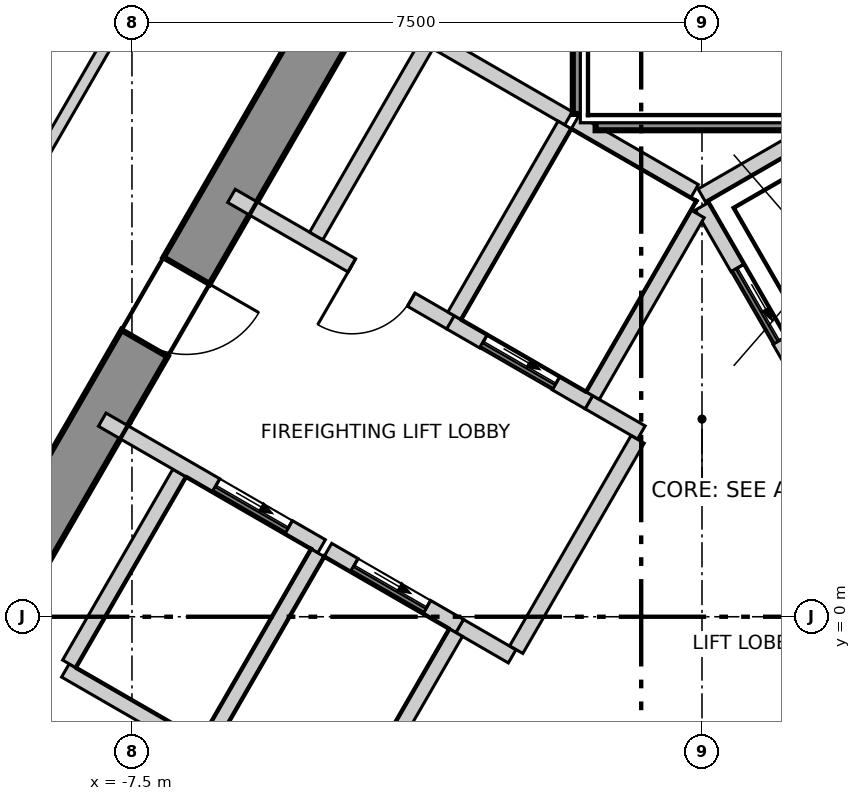
"""IFC4 building model, lengths in metres.
Left out: names, types, materials, properties, quantities, classifications, styles, units other than length and angle.
Written with IfcOpenShell. Run it as: python <this file> out.ifc"""

import sys

from ifc_helpers import new_model, si_unit, direction, frame, frame_2d, origin, place, context, subcontext, project, spatial, polyline, rectangle, outline, extrude, element, fill, save


model = new_model("IFC4")
c1 = context("Model", 3, precision=1e-05, world=origin(), true_north=direction((0.0, 1.0)))
c2 = subcontext(c1, "Body", "Model", "MODEL_VIEW")
j1 = project(units=[si_unit("LENGTHUNIT", "METRE"), si_unit("PLANEANGLEUNIT", "RADIAN")], contexts=[c1])
p1 = place(None, origin())
s1 = spatial("IfcSite", under=j1, at=p1, CompositionType="ELEMENT")
p2 = place(p1, origin())
s2 = spatial("IfcBuilding", under=s1, at=p2, CompositionType="ELEMENT")
p3 = place(p2, frame((0.0, 0.0, 251.3)))
s3 = spatial("IfcBuildingStorey", under=s2, at=p3, CompositionType="ELEMENT", Elevation=251.3)
p4 = place(p3, frame((-1.703, 13.35, -0.3), z_axis=(0.0, 0.0, 1.0), x_axis=(-0.500011533395, -0.866018744874, 0.0)))
e1 = element("IfcWall", 1, at=p4, inside=s3, PredefinedType="SHEAR", context=c2, shape_type="SweptSolid", body=[
    extrude(outline(polyline([(-0.202, -0.35), (1.782, -0.35), (3.766, -0.35), (5.75, -0.35), (7.734, -0.35), (9.718, -0.35), (11.702, -0.35), (13.686, -0.35), (15.67, -0.35), (17.654, -0.35), (19.638, -0.35), (21.622, -0.35), (21.218, 0.35), (19.307, 0.35), (17.397, 0.35), (15.486, 0.35), (13.576, 0.35), (11.665, 0.35), (9.755, 0.35), (7.844, 0.35), (5.934, 0.35), (4.023, 0.35), (2.113, 0.35), (0.202, 0.35), (-0.202, -0.35)])), origin(), (0.0, 0.0, 1.0), 4.2),
])
p5 = place(p4, frame((10.16, 0.0, 0.3)))
e2 = element("IfcOpeningElement", 2, at=p5, cuts=e1, PredefinedType="OPENING", context=c2, shape_type="SweptSolid", body=[
    extrude(rectangle(XDim=1.1, YDim=2.1, at=frame_2d((0.55, 1.05))), frame((0.0, 0.36, 0.0), z_axis=(0.0, -1.0, 0.0), x_axis=(1.0, 0.0, 0.0)), (0.0, 0.0, 1.0), 0.72),
])
p6 = place(p3, frame((-2.641, 29.489, 0.0), z_axis=(0.0, 0.0, 1.0), x_axis=(-0.500004868955, -0.866022592674, 0.0)))
e3 = element("IfcWall", 3, at=p6, inside=s3, PredefinedType="ELEMENTEDWALL", context=c2, shape_type="SweptSolid", body=[
    extrude(rectangle(XDim=48.416, YDim=0.2, at=frame_2d((24.208, 0.0))), origin(), (0.0, 0.0, 1.0), 3.9),
])
p7 = place(p6, frame((2.067, 0.0, 0.9)))
e4 = element("IfcOpeningElement", 4, at=p7, cuts=e3, PredefinedType="OPENING", context=c2, shape_type="SweptSolid", body=[
    extrude(rectangle(XDim=4.2, YDim=2.5, at=frame_2d((2.1, 1.25))), frame((0.0, 0.11, 0.0), z_axis=(0.0, -1.0, 0.0), x_axis=(1.0, 0.0, 0.0)), (0.0, 0.0, 1.0), 0.22),
])
p8 = place(p6, frame((7.796, 0.0, 0.9)))
e5 = element("IfcOpeningElement", 5, at=p8, cuts=e3, PredefinedType="OPENING", context=c2, shape_type="SweptSolid", body=[
    extrude(rectangle(XDim=4.2, YDim=2.5, at=frame_2d((2.1, 1.25))), frame((0.0, 0.11, 0.0), z_axis=(0.0, -1.0, 0.0), x_axis=(1.0, 0.0, 0.0)), (0.0, 0.0, 1.0), 0.22),
])
p9 = place(p6, frame((13.524, 0.0, 0.9)))
e6 = element("IfcOpeningElement", 6, at=p9, cuts=e3, PredefinedType="OPENING", context=c2, shape_type="SweptSolid", body=[
    extrude(rectangle(XDim=4.2, YDim=2.5, at=frame_2d((2.1, 1.25))), frame((0.0, 0.11, 0.0), z_axis=(0.0, -1.0, 0.0), x_axis=(1.0, 0.0, 0.0)), (0.0, 0.0, 1.0), 0.22),
])
p10 = place(p6, frame((19.253, 0.0, 0.9)))
e7 = element("IfcOpeningElement", 7, at=p10, cuts=e3, PredefinedType="OPENING", context=c2, shape_type="SweptSolid", body=[
    extrude(rectangle(XDim=4.2, YDim=2.5, at=frame_2d((2.1, 1.25))), frame((0.0, 0.11, 0.0), z_axis=(0.0, -1.0, 0.0), x_axis=(1.0, 0.0, 0.0)), (0.0, 0.0, 1.0), 0.22),
])
p11 = place(p6, frame((24.982, 0.0, 0.9)))
e8 = element("IfcOpeningElement", 8, at=p11, cuts=e3, PredefinedType="OPENING", context=c2, shape_type="SweptSolid", body=[
    extrude(rectangle(XDim=4.2, YDim=2.5, at=frame_2d((2.1, 1.25))), frame((0.0, 0.11, 0.0), z_axis=(0.0, -1.0, 0.0), x_axis=(1.0, 0.0, 0.0)), (0.0, 0.0, 1.0), 0.22),
])
p12 = place(p6, frame((30.711, 0.0, 0.9)))
e9 = element("IfcOpeningElement", 9, at=p12, cuts=e3, PredefinedType="OPENING", context=c2, shape_type="SweptSolid", body=[
    extrude(rectangle(XDim=4.2, YDim=2.5, at=frame_2d((2.1, 1.25))), frame((0.0, 0.11, 0.0), z_axis=(0.0, -1.0, 0.0), x_axis=(1.0, 0.0, 0.0)), (0.0, 0.0, 1.0), 0.22),
])
p13 = place(p6, frame((36.439, 0.0, 0.9)))
e10 = element("IfcOpeningElement", 10, at=p13, cuts=e3, PredefinedType="OPENING", context=c2, shape_type="SweptSolid", body=[
    extrude(rectangle(XDim=4.2, YDim=2.5, at=frame_2d((2.1, 1.25))), frame((0.0, 0.11, 0.0), z_axis=(0.0, -1.0, 0.0), x_axis=(1.0, 0.0, 0.0)), (0.0, 0.0, 1.0), 0.22),
])
p14 = place(p6, frame((42.168, 0.0, 0.9)))
e11 = element("IfcOpeningElement", 11, at=p14, cuts=e3, PredefinedType="OPENING", context=c2, shape_type="SweptSolid", body=[
    extrude(rectangle(XDim=4.2, YDim=2.5, at=frame_2d((2.1, 1.25))), frame((0.0, 0.11, 0.0), z_axis=(0.0, -1.0, 0.0), x_axis=(1.0, 0.0, 0.0)), (0.0, 0.0, 1.0), 0.22),
])
p15 = place(p3, frame((-15.184, -5.2, 0.0), z_axis=(0.0, 0.0, 1.0), x_axis=(0.499984831513, 0.866034161138, 0.0)))
e12 = element("IfcWall", 12, at=p15, inside=s3, PredefinedType="PARTITIONING", context=c2, shape_type="SweptSolid", body=[
    extrude(rectangle(XDim=24.191, YDim=0.15, at=frame_2d((12.095, 0.0))), origin(), (0.0, 0.0, 1.0), 3.9),
])
p16 = place(p15, frame((20.408, 0.0, 0.0)))
e13 = element("IfcOpeningElement", 13, at=p16, cuts=e12, PredefinedType="OPENING", context=c2, shape_type="SweptSolid", body=[
    extrude(rectangle(XDim=1.2, YDim=2.1, at=frame_2d((0.6, 1.05))), frame((0.0, 0.085, 0.0), z_axis=(0.0, -1.0, 0.0), x_axis=(1.0, 0.0, 0.0)), (0.0, 0.0, 1.0), 0.17),
])
p17 = place(p15, frame((11.596, 0.0, 0.0)))
e14 = element("IfcOpeningElement", 14, at=p17, cuts=e12, PredefinedType="OPENING", context=c2, shape_type="SweptSolid", body=[
    extrude(rectangle(XDim=1.0, YDim=2.1, at=frame_2d((0.5, 1.05))), frame((0.0, 0.085, 0.0), z_axis=(0.0, -1.0, 0.0), x_axis=(1.0, 0.0, 0.0)), (0.0, 0.0, 1.0), 0.17),
])
p18 = place(p15, frame((2.584, 0.0, 0.0)))
e15 = element("IfcOpeningElement", 15, at=p18, cuts=e12, PredefinedType="OPENING", context=c2, shape_type="SweptSolid", body=[
    extrude(rectangle(XDim=1.2, YDim=2.1, at=frame_2d((0.6, 1.05))), frame((0.0, 0.085, 0.0), z_axis=(0.0, -1.0, 0.0), x_axis=(1.0, 0.0, 0.0)), (0.0, 0.0, 1.0), 0.17),
])
p19 = place(p3, frame((-8.376, -0.707, 0.0), z_axis=(0.0, 0.0, 1.0), x_axis=(0.866067520717, -0.499927044236, 0.0)))
e16 = element("IfcWall", 16, at=p19, inside=s3, PredefinedType="SOLIDWALL", context=c2, shape_type="SweptSolid", body=[
    extrude(rectangle(XDim=2.1, YDim=0.2, at=frame_2d((1.05, 0.0))), origin(), (0.0, 0.0, 1.0), 3.9),
])
p20 = place(p3, frame((-8.326, -0.62, 0.0), z_axis=(0.0, 0.0, 1.0), x_axis=(0.500023687443, 0.866011727401, 0.0)))
e17 = element("IfcWall", 17, at=p20, inside=s3, PredefinedType="SOLIDWALL", context=c2, shape_type="SweptSolid", body=[
    extrude(rectangle(XDim=2.9, YDim=0.2, at=frame_2d((1.45, 0.0))), origin(), (0.0, 0.0, 1.0), 3.9),
])
p21 = place(p3, frame((-0.002, 5.541, 0.0), z_axis=(0.0, 0.0, 1.0), x_axis=(0.86600155993, 0.500041296494, 0.0)))
e18 = element("IfcWall", 18, at=p21, inside=s3, PredefinedType="SOLIDWALL", context=c2, shape_type="SweptSolid", body=[
    extrude(rectangle(XDim=4.132, YDim=0.2, at=frame_2d((2.066, 0.0))), origin(), (0.0, 0.0, 1.0), 3.9),
])
p22 = place(p3, frame((0.0, 5.4, 0.0), z_axis=(0.0, 0.0, 1.0), x_axis=(0.500103862429, -0.865965430478, 0.0)))
e19 = element("IfcWall", 19, at=p22, inside=s3, PredefinedType="SOLIDWALL", context=c2, shape_type="SweptSolid", body=[
    extrude(rectangle(XDim=2.973, YDim=0.2, at=frame_2d((1.487, 0.0))), origin(), (0.0, 0.0, 1.0), 3.9),
])
p23 = place(p22, frame((0.937, 0.0, 0.0)))
e20 = element("IfcOpeningElement", 20, at=p23, cuts=e19, PredefinedType="OPENING", context=c2, shape_type="SweptSolid", body=[
    extrude(rectangle(XDim=1.1, YDim=2.1, at=frame_2d((0.55, 1.05))), frame((0.0, 0.11, 0.0), z_axis=(0.0, -1.0, 0.0), x_axis=(1.0, 0.0, 0.0)), (0.0, 0.0, 1.0), 0.22),
])
p24 = place(p3, frame((-7.891, 2.593, 0.0), z_axis=(0.0, 0.0, 1.0), x_axis=(0.866070917804, -0.499921159118, 0.0)))
e21 = element("IfcWall", 21, at=p24, inside=s3, PredefinedType="SOLIDWALL", context=c2, shape_type="SweptSolid", body=[
    extrude(rectangle(XDim=3.333, YDim=0.2, at=frame_2d((1.666, 0.0))), origin(), (0.0, 0.0, 1.0), 3.9),
])
p25 = place(p24, frame((1.73, 0.0, 0.0)))
e22 = element("IfcOpeningElement", 22, at=p25, cuts=e21, PredefinedType="OPENING", context=c2, shape_type="SweptSolid", body=[
    extrude(rectangle(XDim=1.1, YDim=2.1, at=frame_2d((0.55, 1.05))), frame((0.0, 0.11, 0.0), z_axis=(0.0, -1.0, 0.0), x_axis=(1.0, 0.0, 0.0)), (0.0, 0.0, 1.0), 0.22),
])
p26 = place(p3, frame((-3.188, -0.122, 0.0), z_axis=(0.0, 0.0, 1.0), x_axis=(0.865705793592, -0.50055317294, 0.0)))
e23 = element("IfcWall", 23, at=p26, inside=s3, PredefinedType="SOLIDWALL", context=c2, shape_type="SweptSolid", body=[
    extrude(rectangle(XDim=0.797, YDim=0.2, at=frame_2d((0.398, 0.0))), origin(), (0.0, 0.0, 1.0), 3.9),
])
p27 = place(p3, frame((-6.191, 5.537, 0.0), z_axis=(0.0, 0.0, 1.0), x_axis=(0.866052607023, -0.499952879648, 0.0)))
e24 = element("IfcWall", 24, at=p27, inside=s3, PredefinedType="SOLIDWALL", context=c2, shape_type="SweptSolid", body=[
    extrude(rectangle(XDim=3.332, YDim=0.2, at=frame_2d((1.666, 0.0))), origin(), (0.0, 0.0, 1.0), 3.9),
])
p28 = place(p27, frame((1.83, 0.0, 0.0)))
e25 = element("IfcOpeningElement", 25, at=p28, cuts=e24, PredefinedType="OPENING", context=c2, shape_type="SweptSolid", body=[
    extrude(rectangle(XDim=0.9, YDim=2.1, at=frame_2d((0.45, 1.05))), frame((0.0, 0.11, 0.0), z_axis=(0.0, -1.0, 0.0), x_axis=(1.0, 0.0, 0.0)), (0.0, 0.0, 1.0), 0.22),
])
p29 = place(p3, frame((-1.488, 2.822, 0.0), z_axis=(0.0, 0.0, 1.0), x_axis=(0.866236612152, -0.499633997809, 0.0)))
e26 = element("IfcWall", 26, at=p29, inside=s3, PredefinedType="SOLIDWALL", context=c2, shape_type="SweptSolid", body=[
    extrude(rectangle(XDim=0.796, YDim=0.2, at=frame_2d((0.398, 0.0))), origin(), (0.0, 0.0, 1.0), 3.9),
])
p30 = place(p3, frame((-5.076, 5.009, 0.0), z_axis=(0.0, 0.0, 1.0), x_axis=(0.50002537861, 0.866010750942, 0.0)))
e27 = element("IfcWall", 27, at=p30, inside=s3, PredefinedType="SOLIDWALL", context=c2, shape_type="SweptSolid", body=[
    extrude(rectangle(XDim=3.0, YDim=0.2, at=frame_2d((1.5, 0.0))), origin(), (0.0, 0.0, 1.0), 3.9),
])
p31 = place(p3, frame((-3.489, 7.557, 0.0), z_axis=(0.0, 0.0, 1.0), x_axis=(0.866010750942, -0.50002537861, 0.0)))
e28 = element("IfcWall", 28, at=p31, inside=s3, PredefinedType="SOLIDWALL", context=c2, shape_type="SweptSolid", body=[
    extrude(rectangle(XDim=2.0, YDim=0.2, at=frame_2d((1.0, 0.0))), origin(), (0.0, 0.0, 1.0), 3.9),
])
p32 = place(p3, frame((-2.444, -0.433, 0.0), z_axis=(0.0, 0.0, 1.0), x_axis=(0.500035624827, 0.866004834804, 0.0)))
e29 = element("IfcWall", 29, at=p32, inside=s3, PredefinedType="SOLIDWALL", context=c2, shape_type="SweptSolid", body=[
    extrude(rectangle(XDim=3.194, YDim=0.2, at=frame_2d((1.597, 0.0))), origin(), (0.0, 0.0, 1.0), 3.9),
])
p33 = place(p3, frame((-6.507, -1.67, 0.0), z_axis=(0.0, 0.0, 1.0), x_axis=(0.50012328804, 0.865954211699, 0.0)))
e30 = element("IfcWall", 30, at=p33, inside=s3, PredefinedType="SOLIDWALL", context=c2, shape_type="SweptSolid", body=[
    extrude(rectangle(XDim=2.9, YDim=0.2, at=frame_2d((1.45, 0.0))), origin(), (0.0, 0.0, 1.0), 3.9),
])
p34 = place(p3, frame((-4.922, 0.879, 0.0), z_axis=(0.0, 0.0, 1.0), x_axis=(0.866073918653, -0.499915960366, 0.0)))
e31 = element("IfcWall", 31, at=p34, inside=s3, PredefinedType="SOLIDWALL", context=c2, shape_type="SweptSolid", body=[
    extrude(rectangle(XDim=2.002, YDim=0.2, at=frame_2d((1.001, 0.0))), origin(), (0.0, 0.0, 1.0), 3.9),
])
p35 = place(p34, frame((0.402, 0.0, 0.0)))
e32 = element("IfcOpeningElement", 32, at=p35, cuts=e31, PredefinedType="OPENING", context=c2, shape_type="SweptSolid", body=[
    extrude(rectangle(XDim=1.1, YDim=2.1, at=frame_2d((0.55, 1.05))), frame((0.0, 0.11, 0.0), z_axis=(0.0, -1.0, 0.0), x_axis=(1.0, 0.0, 0.0)), (0.0, 0.0, 1.0), 0.22),
])
p36 = place(p3, frame((-4.619, -2.6, 0.0), z_axis=(0.0, 0.0, 1.0), x_axis=(0.50009492287, 0.865970593103, 0.0)))
e33 = element("IfcWall", 33, at=p36, inside=s3, PredefinedType="SOLIDWALL", context=c2, shape_type="SweptSolid", body=[
    extrude(rectangle(XDim=2.761, YDim=0.2, at=frame_2d((1.381, 0.0))), origin(), (0.0, 0.0, 1.0), 3.9),
])
p37 = place(p3, frame((-3.309, 3.873, 0.0), z_axis=(0.0, 0.0, 1.0), x_axis=(0.866098583652, -0.499873227325, 0.0)))
e34 = element("IfcWall", 34, at=p37, inside=s3, PredefinedType="SOLIDWALL", context=c2, shape_type="SweptSolid", body=[
    extrude(rectangle(XDim=2.103, YDim=0.2, at=frame_2d((1.051, 0.0))), origin(), (0.0, 0.0, 1.0), 3.9),
])
p38 = place(p37, frame((0.502, 0.0, 0.0)))
e35 = element("IfcOpeningElement", 35, at=p38, cuts=e34, PredefinedType="OPENING", context=c2, shape_type="SweptSolid", body=[
    extrude(rectangle(XDim=1.1, YDim=2.1, at=frame_2d((0.55, 1.05))), frame((0.0, 0.11, 0.0), z_axis=(0.0, -1.0, 0.0), x_axis=(1.0, 0.0, 0.0)), (0.0, 0.0, 1.0), 0.22),
])
p39 = place(p3, frame((-3.257, 3.959, 0.0), z_axis=(0.0, 0.0, 1.0), x_axis=(0.50012328804, 0.865954211699, 0.0)))
e36 = element("IfcWall", 36, at=p39, inside=s3, PredefinedType="SOLIDWALL", context=c2, shape_type="SweptSolid", body=[
    extrude(rectangle(XDim=2.9, YDim=0.2, at=frame_2d((1.45, 0.0))), origin(), (0.0, 0.0, 1.0), 3.9),
])
p40 = place(p3, frame((-1.67, 6.507, 0.0), z_axis=(0.0, 0.0, 1.0), x_axis=(0.865941441609, -0.500145398563, 0.0)))
e37 = element("IfcWall", 37, at=p40, inside=s3, PredefinedType="SOLIDWALL", context=c2, shape_type="SweptSolid", body=[
    extrude(rectangle(XDim=1.815, YDim=0.2, at=frame_2d((0.908, 0.0))), origin(), (0.0, 0.0, 1.0), 3.9),
])
p41 = place(p3, frame((-1.438, 2.909, 0.0), z_axis=(0.0, 0.0, 1.0), x_axis=(0.499829630636, 0.866123744241, 0.0)))
e38 = element("IfcWall", 38, at=p41, inside=s3, PredefinedType="SOLIDWALL", context=c2, shape_type="SweptSolid", body=[
    extrude(rectangle(XDim=2.761, YDim=0.2, at=frame_2d((1.38, 0.0))), origin(), (0.0, 0.0, 1.0), 3.9),
])
p42 = place(p3, frame((-1.4, 6.5, 0.0), z_axis=(0.0, 0.0, 1.0), x_axis=(1.0, 0.0, 0.0)))
e39 = element("IfcWall", 39, at=p42, inside=s3, PredefinedType="SOLIDWALL", context=c2, shape_type="SweptSolid", body=[
    extrude(rectangle(XDim=2.8, YDim=0.2, at=frame_2d((1.4, 0.0))), origin(), (0.0, 0.0, 1.0), 3.9),
])
p43 = place(p3, frame((-1.6, 6.615, 0.0), z_axis=(0.0, 0.0, 1.0), x_axis=(0.0, 1.0, 0.0)))
e40 = element("IfcWall", 40, at=p43, inside=s3, PredefinedType="SOLIDWALL", context=c2, shape_type="SweptSolid", body=[
    extrude(rectangle(XDim=6.715, YDim=0.2, at=frame_2d((3.357, 0.0))), origin(), (0.0, 0.0, 1.0), 3.9),
])
p44 = place(p23, origin())
e41 = element("IfcDoor", 41, at=p44, inside=s3, OperationType="SLIDING_TO_LEFT", PredefinedType="DOOR", context=c2, shape_type="SweptSolid", body=[
    extrude(rectangle(XDim=1.1, YDim=2.1, at=frame_2d((0.55, 1.05))), frame((0.0, 0.025, 0.0), z_axis=(0.0, -1.0, 0.0), x_axis=(1.0, 0.0, 0.0)), (0.0, 0.0, 1.0), 0.05),
])
fill(e20, e41)
p45 = place(p35, origin())
e42 = element("IfcDoor", 42, at=p45, inside=s3, OperationType="SLIDING_TO_LEFT", PredefinedType="DOOR", context=c2, shape_type="SweptSolid", body=[
    extrude(rectangle(XDim=1.1, YDim=2.1, at=frame_2d((0.55, 1.05))), frame((0.0, 0.025, 0.0), z_axis=(0.0, -1.0, 0.0), x_axis=(1.0, 0.0, 0.0)), (0.0, 0.0, 1.0), 0.05),
])
fill(e32, e42)
p46 = place(p38, origin())
e43 = element("IfcDoor", 43, at=p46, inside=s3, OperationType="SLIDING_TO_LEFT", PredefinedType="DOOR", context=c2, shape_type="SweptSolid", body=[
    extrude(rectangle(XDim=1.1, YDim=2.1, at=frame_2d((0.55, 1.05))), frame((0.0, 0.025, 0.0), z_axis=(0.0, -1.0, 0.0), x_axis=(1.0, 0.0, 0.0)), (0.0, 0.0, 1.0), 0.05),
])
fill(e35, e43)
p47 = place(p25, origin())
e44 = element("IfcDoor", 44, at=p47, inside=s3, OperationType="SLIDING_TO_LEFT", PredefinedType="DOOR", context=c2, shape_type="SweptSolid", body=[
    extrude(rectangle(XDim=1.1, YDim=2.1, at=frame_2d((0.55, 1.05))), frame((0.0, 0.025, 0.0), z_axis=(0.0, -1.0, 0.0), x_axis=(1.0, 0.0, 0.0)), (0.0, 0.0, 1.0), 0.05),
])
fill(e22, e44)
p48 = place(p28, origin())
e45 = element("IfcDoor", 45, at=p48, inside=s3, OperationType="SINGLE_SWING_LEFT", PredefinedType="DOOR", context=c2, shape_type="SweptSolid", body=[
    extrude(rectangle(XDim=0.9, YDim=2.1, at=frame_2d((0.45, 1.05))), frame((0.0, 0.025, 0.0), z_axis=(0.0, -1.0, 0.0), x_axis=(1.0, 0.0, 0.0)), (0.0, 0.0, 1.0), 0.05),
])
fill(e25, e45)
p49 = place(p5, origin())
e46 = element("IfcDoor", 46, at=p49, inside=s3, OperationType="SINGLE_SWING_RIGHT", PredefinedType="DOOR", context=c2, shape_type="SweptSolid", body=[
    extrude(rectangle(XDim=1.1, YDim=2.1, at=frame_2d((0.55, 1.05))), frame((0.0, 0.025, 0.0), z_axis=(0.0, -1.0, 0.0), x_axis=(1.0, 0.0, 0.0)), (0.0, 0.0, 1.0), 0.05),
])
fill(e2, e46)
save(model, sys.argv[1])
